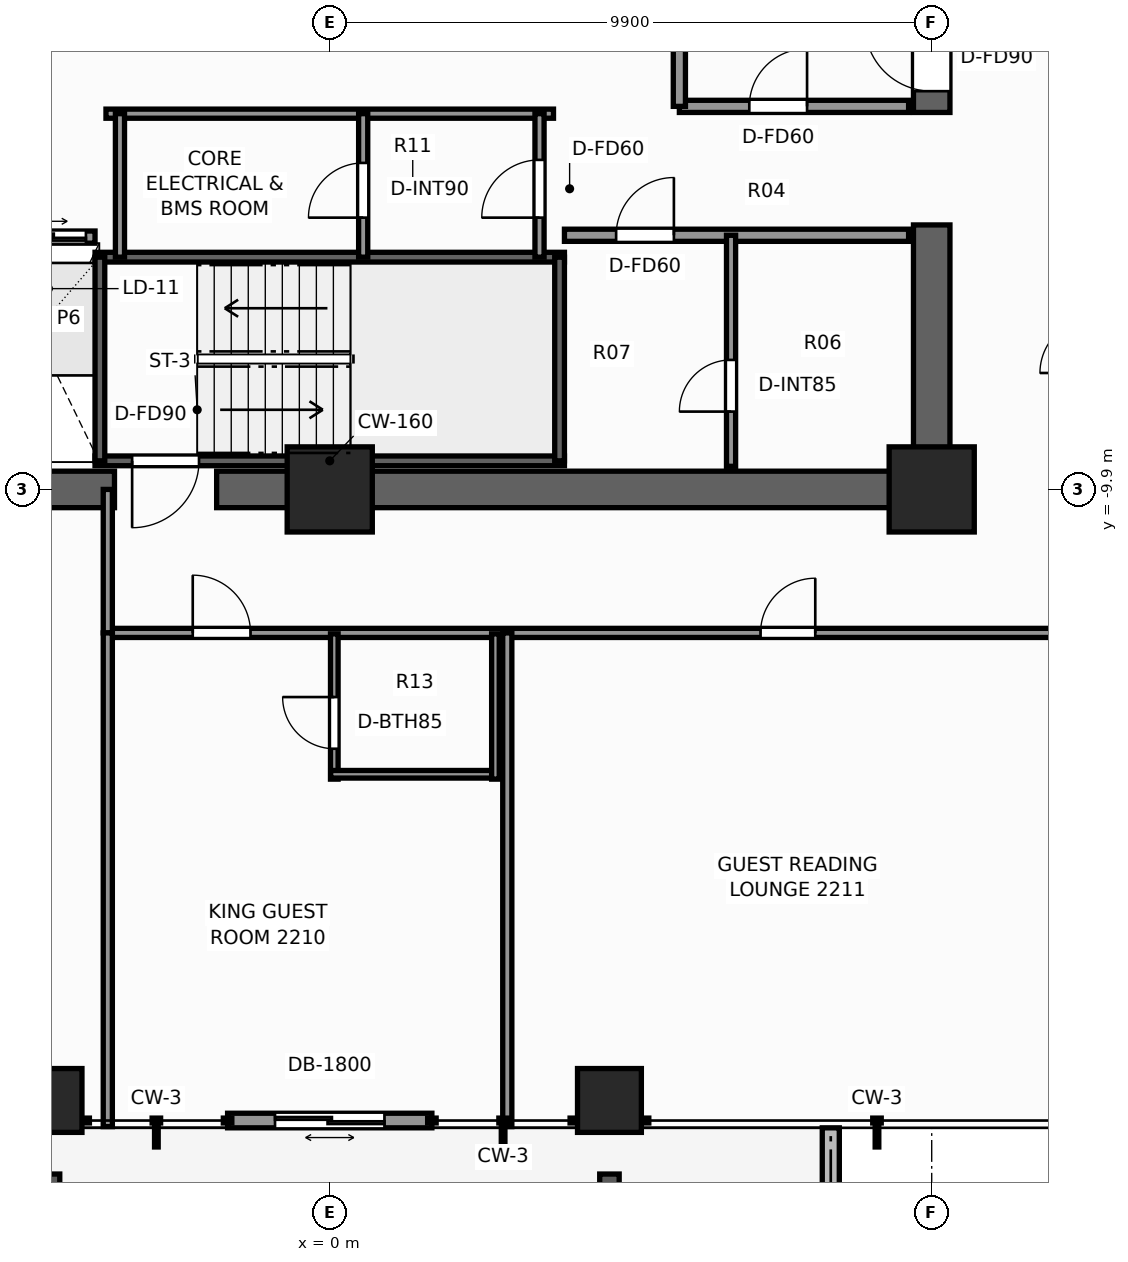
"""IFC4 building model, lengths in metres.
Left out: names, types, materials, properties, quantities, classifications, styles, units other than length and angle.
Written with IfcOpenShell. Run it as: python <this file> out.ifc"""

import sys

from ifc_helpers import new_model, si_unit, direction, frame, frame_2d, origin, origin_2d, place, context, subcontext, project, spatial, rectangle, extrude, element, fill, save


model = new_model("IFC4")
c1 = context("Model", 3, precision=1e-05, world=origin(), true_north=direction((0.0, 1.0)))
c2 = subcontext(c1, "Body", "Model", "MODEL_VIEW")
j1 = project(units=[si_unit("LENGTHUNIT", "METRE"), si_unit("PLANEANGLEUNIT", "RADIAN")], contexts=[c1])
p1 = place(None, origin())
s1 = spatial("IfcSite", under=j1, at=p1, CompositionType="ELEMENT")
p2 = place(p1, origin())
s2 = spatial("IfcBuilding", under=s1, at=p2, CompositionType="ELEMENT")
p3 = place(p2, frame((0.0, 0.0, 78.8)))
s3 = spatial("IfcBuildingStorey", under=s2, at=p3, CompositionType="ELEMENT", Elevation=78.8)
p4 = place(p3, frame((10.2, -9.9, 0.0), z_axis=(0.0, 0.0, 1.0), x_axis=(-1.0, 0.0, 0.0)))
e1 = element("IfcWall", 1, at=p4, inside=s3, PredefinedType="SHEAR", context=c2, shape_type="SweptSolid", body=[
    extrude(rectangle(XDim=12.06, YDim=0.6, at=frame_2d((6.03, 0.0))), origin(), (0.0, 0.0, 1.0), 3.3),
])
p5 = place(p3, frame((-3.54, -9.9, 0.0), z_axis=(0.0, 0.0, 1.0), x_axis=(-1.0, 0.0, 0.0)))
e2 = element("IfcWall", 2, at=p5, inside=s3, PredefinedType="SHEAR", context=c2, shape_type="SweptSolid", body=[
    extrude(rectangle(XDim=6.66, YDim=0.6, at=frame_2d((3.33, 0.0))), origin(), (0.0, 0.0, 1.0), 3.3),
])
p6 = place(p3, frame((9.9, -9.6, 0.0), z_axis=(0.0, 0.0, 1.0), x_axis=(0.0, 1.0, 0.0)))
e3 = element("IfcWall", 3, at=p6, inside=s3, PredefinedType="SHEAR", context=c2, shape_type="SweptSolid", body=[
    extrude(rectangle(XDim=4.05, YDim=0.6, at=frame_2d((2.025, 0.0))), origin(), (0.0, 0.0, 1.0), 3.3),
])
p7 = place(p3, frame((9.9, -3.7, 0.0), z_axis=(0.0, 0.0, 1.0), x_axis=(0.0, 1.0, 0.0)))
e4 = element("IfcWall", 4, at=p7, inside=s3, PredefinedType="SHEAR", context=c2, shape_type="SweptSolid", body=[
    extrude(rectangle(XDim=13.3, YDim=0.6, at=frame_2d((6.65, 0.0))), origin(), (0.0, 0.0, 1.0), 3.3),
])
p8 = place(p7, frame((0.35, 0.0, 0.0)))
e5 = element("IfcOpeningElement", 5, at=p8, cuts=e4, PredefinedType="OPENING", context=c2, shape_type="SweptSolid", body=[
    extrude(rectangle(XDim=1.1, YDim=2.2, at=frame_2d((0.55, 1.1))), frame((0.0, 0.31, 0.0), z_axis=(0.0, -1.0, 0.0), x_axis=(1.0, 0.0, 0.0)), (0.0, 0.0, 1.0), 0.62),
])
for number, where, z_axis, x_axis in (
    (6, (9.9, -9.9, 0.0), (0.0, 0.0, 1.0), (1.0, 0.0, 0.0)),
    (7, (0.0, -9.9, 0.0), (0.0, 0.0, 1.0), (1.0, 0.0, 0.0)),
):
    element("IfcColumn", number, at=place(p3, frame(where, z_axis=z_axis, x_axis=x_axis)), inside=s3, PredefinedType="COLUMN", context=c2, shape_type="SweptSolid", body=[
        extrude(rectangle(XDim=1.4, YDim=1.4, at=origin_2d()), origin(), (0.0, 0.0, 1.0), 3.3),
    ])
for number, where, z_axis, x_axis in (
    (8, (-4.6, -19.95, 0.0), (0.0, 0.0, 1.0), (1.0, 0.0, 0.0)),
    (9, (4.6, -19.95, 0.0), (0.0, 0.0, 1.0), (1.0, 0.0, 0.0)),
):
    element("IfcColumn", number, at=place(p3, frame(where, z_axis=z_axis, x_axis=x_axis)), inside=s3, PredefinedType="COLUMN", context=c2, shape_type="SweptSolid", body=[
        extrude(rectangle(XDim=1.05, YDim=1.05, at=origin_2d()), origin(), (0.0, 0.0, 1.0), 3.3),
    ])
p9 = place(p3, frame((8.24, -23.074, -0.04), z_axis=(0.0, 0.0, 1.0), x_axis=(0.0, 1.0, 0.0)))
e10 = element("IfcWall", 10, at=p9, inside=s3, PredefinedType="PARAPET", context=c2, shape_type="SweptSolid", body=[
    extrude(rectangle(XDim=2.674, YDim=0.28, at=frame_2d((1.337, 0.0))), origin(), (0.0, 0.0, 1.0), 0.42),
])
p10 = place(p3, frame((1.68, -20.28, 0.0), z_axis=(0.0, 0.0, 1.0), x_axis=(-1.0, 0.0, 0.0)))
e11 = element("IfcWall", 11, at=p10, inside=s3, PredefinedType="STANDARD", context=c2, shape_type="SweptSolid", body=[
    extrude(rectangle(XDim=3.36, YDim=0.24, at=frame_2d((1.68, 0.0))), origin(), (0.0, 0.0, 1.0), 3.08),
])
p11 = place(p10, frame((0.78, 0.0, 0.0)))
e12 = element("IfcOpeningElement", 12, at=p11, cuts=e11, PredefinedType="OPENING", context=c2, shape_type="SweptSolid", body=[
    extrude(rectangle(XDim=1.8, YDim=2.2, at=frame_2d((0.9, 1.1))), frame((0.0, 0.13, 0.0), z_axis=(0.0, -1.0, 0.0), x_axis=(1.0, 0.0, 0.0)), (0.0, 0.0, 1.0), 0.26),
])
p12 = place(p3, frame((3.86, -9.43, 0.0), z_axis=(0.0, 0.0, 1.0), x_axis=(-1.0, 0.0, 0.0)))
e13 = element("IfcWall", 13, at=p12, inside=s3, PredefinedType="SHEAR", context=c2, shape_type="SweptSolid", body=[
    extrude(rectangle(XDim=7.72, YDim=0.16, at=frame_2d((3.86, 0.0))), origin(), (0.0, 0.0, 1.0), 3.3),
])
p13 = place(p12, frame((6.01, 0.0, 0.0)))
e14 = element("IfcOpeningElement", 14, at=p13, cuts=e13, PredefinedType="OPENING", context=c2, shape_type="SweptSolid", body=[
    extrude(rectangle(XDim=1.1, YDim=2.2, at=frame_2d((0.55, 1.1))), frame((0.0, 0.09, 0.0), z_axis=(0.0, -1.0, 0.0), x_axis=(1.0, 0.0, 0.0)), (0.0, 0.0, 1.0), 0.18),
])
p14 = place(p3, frame((-3.86, -6.08, 0.0), z_axis=(0.0, 0.0, 1.0), x_axis=(1.0, 0.0, 0.0)))
e15 = element("IfcWall", 15, at=p14, inside=s3, PredefinedType="SHEAR", context=c2, shape_type="SweptSolid", body=[
    extrude(rectangle(XDim=7.72, YDim=0.16, at=frame_2d((3.86, 0.0))), origin(), (0.0, 0.0, 1.0), 3.3),
])
for number, where, z_axis, x_axis in (
    (16, (-3.78, -9.43, 0.0), (0.0, 0.0, 1.0), (0.0, 1.0, 0.0)),
    (17, (3.78, -9.43, 0.0), (0.0, 0.0, 1.0), (0.0, 1.0, 0.0)),
):
    element("IfcWall", number, at=place(p3, frame(where, z_axis=z_axis, x_axis=x_axis)), inside=s3, PredefinedType="SHEAR", context=c2, shape_type="SweptSolid", body=[
        extrude(rectangle(XDim=3.35, YDim=0.16, at=frame_2d((1.675, 0.0))), origin(), (0.0, 0.0, 1.0), 3.3),
    ])
p15 = place(p3, frame((5.75, -3.6, 0.0), z_axis=(0.0, 0.0, 1.0), x_axis=(1.0, 0.0, 0.0)))
e18 = element("IfcWall", 18, at=p15, inside=s3, PredefinedType="SOLIDWALL", context=c2, shape_type="SweptSolid", body=[
    extrude(rectangle(XDim=3.77, YDim=0.2, at=frame_2d((1.885, 0.0))), origin(), (0.0, 0.0, 1.0), 3.08),
])
p16 = place(p15, frame((1.15, 0.0, 0.0)))
e19 = element("IfcOpeningElement", 19, at=p16, cuts=e18, PredefinedType="OPENING", context=c2, shape_type="SweptSolid", body=[
    extrude(rectangle(XDim=0.95, YDim=2.06, at=frame_2d((0.475, 1.03))), frame((0.0, 0.11, 0.0), z_axis=(0.0, -1.0, 0.0), x_axis=(1.0, 0.0, 0.0)), (0.0, 0.0, 1.0), 0.22),
])
p17 = place(p3, frame((5.75, -3.6, 0.0), z_axis=(0.0, 0.0, 1.0), x_axis=(0.0, 1.0, 0.0)))
e20 = element("IfcWall", 20, at=p17, inside=s3, PredefinedType="SOLIDWALL", context=c2, shape_type="SweptSolid", body=[
    extrude(rectangle(XDim=5.57, YDim=0.2, at=frame_2d((2.785, 0.0))), origin(), (0.0, 0.0, 1.0), 3.08),
])
p18 = place(p17, frame((2.75, 0.0, 0.0)))
e21 = element("IfcOpeningElement", 21, at=p18, cuts=e20, PredefinedType="OPENING", context=c2, shape_type="SweptSolid", body=[
    extrude(rectangle(XDim=1.1, YDim=2.2, at=frame_2d((0.55, 1.1))), frame((0.0, 0.11, 0.0), z_axis=(0.0, -1.0, 0.0), x_axis=(1.0, 0.0, 0.0)), (0.0, 0.0, 1.0), 0.22),
])
p19 = place(p3, frame((-9.52, -5.75, 0.0), z_axis=(0.0, 0.0, 1.0), x_axis=(1.0, 0.0, 0.0)))
e22 = element("IfcWall", 22, at=p19, inside=s3, PredefinedType="SOLIDWALL", context=c2, shape_type="SweptSolid", body=[
    extrude(rectangle(XDim=5.66, YDim=0.2, at=frame_2d((2.83, 0.0))), origin(), (0.0, 0.0, 1.0), 3.08),
])
p20 = place(p19, frame((0.55, 0.0, 0.0)))
e23 = element("IfcOpeningElement", 23, at=p20, cuts=e22, PredefinedType="OPENING", context=c2, shape_type="SweptSolid", body=[
    extrude(rectangle(XDim=1.1, YDim=2.2, at=frame_2d((0.55, 1.1))), frame((0.0, 0.11, 0.0), z_axis=(0.0, -1.0, 0.0), x_axis=(1.0, 0.0, 0.0)), (0.0, 0.0, 1.0), 0.22),
])
p21 = place(p19, frame((2.48, 0.0, 0.0)))
e24 = element("IfcOpeningElement", 24, at=p21, cuts=e22, PredefinedType="OPENING", context=c2, shape_type="SweptSolid", body=[
    extrude(rectangle(XDim=1.1, YDim=2.2, at=frame_2d((0.55, 1.1))), frame((0.0, 0.11, 0.0), z_axis=(0.0, -1.0, 0.0), x_axis=(1.0, 0.0, 0.0)), (0.0, 0.0, 1.0), 0.22),
])
p22 = place(p19, frame((4.41, 0.0, 0.0)))
e25 = element("IfcOpeningElement", 25, at=p22, cuts=e22, PredefinedType="OPENING", context=c2, shape_type="SweptSolid", body=[
    extrude(rectangle(XDim=1.1, YDim=2.2, at=frame_2d((0.55, 1.1))), frame((0.0, 0.11, 0.0), z_axis=(0.0, -1.0, 0.0), x_axis=(1.0, 0.0, 0.0)), (0.0, 0.0, 1.0), 0.22),
])
p23 = place(p3, frame((3.86, -5.72, 0.0), z_axis=(0.0, 0.0, 1.0), x_axis=(1.0, 0.0, 0.0)))
e26 = element("IfcWall", 26, at=p23, inside=s3, PredefinedType="SOLIDWALL", context=c2, shape_type="SweptSolid", body=[
    extrude(rectangle(XDim=5.66, YDim=0.2, at=frame_2d((2.83, 0.0))), origin(), (0.0, 0.0, 1.0), 3.08),
])
p24 = place(p23, frame((0.85, 0.0, 0.0)))
e27 = element("IfcOpeningElement", 27, at=p24, cuts=e26, PredefinedType="OPENING", context=c2, shape_type="SweptSolid", body=[
    extrude(rectangle(XDim=0.95, YDim=2.06, at=frame_2d((0.475, 1.03))), frame((0.0, 0.11, 0.0), z_axis=(0.0, -1.0, 0.0), x_axis=(1.0, 0.0, 0.0)), (0.0, 0.0, 1.0), 0.22),
])
p25 = place(p3, frame((6.6, -9.52, 0.0), z_axis=(0.0, 0.0, 1.0), x_axis=(0.0, 1.0, 0.0)))
e28 = element("IfcWall", 28, at=p25, inside=s3, PredefinedType="PARTITIONING", context=c2, shape_type="SweptSolid", body=[
    extrude(rectangle(XDim=3.8, YDim=0.15, at=frame_2d((1.9, 0.0))), origin(), (0.0, 0.0, 1.0), 3.08),
])
p26 = place(p25, frame((0.9, 0.0, 0.0)))
e29 = element("IfcOpeningElement", 29, at=p26, cuts=e28, PredefinedType="OPENING", context=c2, shape_type="SweptSolid", body=[
    extrude(rectangle(XDim=0.85, YDim=2.03, at=frame_2d((0.425, 1.015))), frame((0.0, 0.085, 0.0), z_axis=(0.0, -1.0, 0.0), x_axis=(1.0, 0.0, 0.0)), (0.0, 0.0, 1.0), 0.17),
])
p27 = place(p3, frame((-3.68, -3.72, 0.0), z_axis=(0.0, 0.0, 1.0), x_axis=(1.0, 0.0, 0.0)))
e30 = element("IfcWall", 30, at=p27, inside=s3, PredefinedType="PARTITIONING", context=c2, shape_type="SweptSolid", body=[
    extrude(rectangle(XDim=7.36, YDim=0.15, at=frame_2d((3.68, 0.0))), origin(), (0.0, 0.0, 1.0), 3.08),
])
p28 = place(p3, frame((3.45, -6.08, 0.0), z_axis=(0.0, 0.0, 1.0), x_axis=(0.0, 1.0, 0.0)))
e31 = element("IfcWall", 31, at=p28, inside=s3, PredefinedType="PARTITIONING", context=c2, shape_type="SweptSolid", body=[
    extrude(rectangle(XDim=2.36, YDim=0.15, at=frame_2d((1.18, 0.0))), origin(), (0.0, 0.0, 1.0), 3.08),
])
p29 = place(p28, frame((0.65, 0.0, 0.0)))
e32 = element("IfcOpeningElement", 32, at=p29, cuts=e31, PredefinedType="OPENING", context=c2, shape_type="SweptSolid", body=[
    extrude(rectangle(XDim=0.95, YDim=2.06, at=frame_2d((0.475, 1.03))), frame((0.0, 0.085, 0.0), z_axis=(0.0, -1.0, 0.0), x_axis=(1.0, 0.0, 0.0)), (0.0, 0.0, 1.0), 0.17),
])
p30 = place(p3, frame((-3.45, -6.08, 0.0), z_axis=(0.0, 0.0, 1.0), x_axis=(0.0, 1.0, 0.0)))
e33 = element("IfcWall", 33, at=p30, inside=s3, PredefinedType="PARTITIONING", context=c2, shape_type="SweptSolid", body=[
    extrude(rectangle(XDim=2.36, YDim=0.15, at=frame_2d((1.18, 0.0))), origin(), (0.0, 0.0, 1.0), 3.08),
])
p31 = place(p3, frame((0.55, -6.08, 0.0), z_axis=(0.0, 0.0, 1.0), x_axis=(0.0, 1.0, 0.0)))
e34 = element("IfcWall", 34, at=p31, inside=s3, PredefinedType="PARTITIONING", context=c2, shape_type="SweptSolid", body=[
    extrude(rectangle(XDim=2.36, YDim=0.15, at=frame_2d((1.18, 0.0))), origin(), (0.0, 0.0, 1.0), 3.08),
])
p32 = place(p31, frame((0.65, 0.0, 0.0)))
e35 = element("IfcOpeningElement", 35, at=p32, cuts=e34, PredefinedType="OPENING", context=c2, shape_type="SweptSolid", body=[
    extrude(rectangle(XDim=0.9, YDim=2.06, at=frame_2d((0.45, 1.03))), frame((0.0, 0.085, 0.0), z_axis=(0.0, -1.0, 0.0), x_axis=(1.0, 0.0, 0.0)), (0.0, 0.0, 1.0), 0.17),
])
p33 = place(p3, frame((-3.65, -12.26, 0.0), z_axis=(0.0, 0.0, 1.0), x_axis=(1.0, 0.0, 0.0)))
e36 = element("IfcWall", 36, at=p33, inside=s3, PredefinedType="PARTITIONING", context=c2, shape_type="SweptSolid", body=[
    extrude(rectangle(XDim=16.23, YDim=0.15, at=frame_2d((8.115, 0.0))), origin(), (0.0, 0.0, 1.0), 2.292),
])
p34 = place(p33, frame((1.397, 0.0, 0.0)))
e37 = element("IfcOpeningElement", 37, at=p34, cuts=e36, PredefinedType="OPENING", context=c2, shape_type="SweptSolid", body=[
    extrude(rectangle(XDim=0.95, YDim=2.06, at=frame_2d((0.475, 1.03))), frame((0.0, 0.085, 0.0), z_axis=(0.0, -1.0, 0.0), x_axis=(1.0, 0.0, 0.0)), (0.0, 0.0, 1.0), 0.17),
])
p35 = place(p33, frame((10.735, 0.0, 0.0)))
e38 = element("IfcOpeningElement", 38, at=p35, cuts=e36, PredefinedType="OPENING", context=c2, shape_type="SweptSolid", body=[
    extrude(rectangle(XDim=0.9, YDim=2.06, at=frame_2d((0.45, 1.03))), frame((0.0, 0.085, 0.0), z_axis=(0.0, -1.0, 0.0), x_axis=(1.0, 0.0, 0.0)), (0.0, 0.0, 1.0), 0.17),
])
p36 = place(p3, frame((-3.65, -12.26, 0.0), z_axis=(0.0, 0.0, 1.0), x_axis=(0.0, 1.0, 0.0)))
e39 = element("IfcWall", 39, at=p36, inside=s3, PredefinedType="PARTITIONING", context=c2, shape_type="SweptSolid", body=[
    extrude(rectangle(XDim=2.36, YDim=0.15, at=frame_2d((1.18, 0.0))), origin(), (0.0, 0.0, 1.0), 3.08),
])
for number, where, z_axis, x_axis in (
    (40, (-3.65, -20.38, 0.0), (0.0, 0.0, 1.0), (0.0, 1.0, 0.0)),
    (41, (2.92, -20.38, 0.0), (0.0, 0.0, 1.0), (0.0, 1.0, 0.0)),
):
    element("IfcWall", number, at=place(p3, frame(where, z_axis=z_axis, x_axis=x_axis)), inside=s3, PredefinedType="PARTITIONING", context=c2, shape_type="SweptSolid", body=[
        extrude(rectangle(XDim=8.12, YDim=0.15, at=frame_2d((4.06, 0.0))), origin(), (0.0, 0.0, 1.0), 2.449),
    ])
p37 = place(p3, frame((0.075, -14.665, 0.0), z_axis=(0.0, 0.0, 1.0), x_axis=(0.0, 1.0, 0.0)))
e42 = element("IfcWall", 42, at=p37, inside=s3, PredefinedType="PARTITIONING", context=c2, shape_type="SweptSolid", body=[
    extrude(rectangle(XDim=2.39, YDim=0.125, at=frame_2d((1.195, 0.0))), origin(), (0.0, 0.0, 1.0), 2.605),
])
p38 = place(p37, frame((0.5, 0.0, 0.0)))
e43 = element("IfcOpeningElement", 43, at=p38, cuts=e42, PredefinedType="OPENING", context=c2, shape_type="SweptSolid", body=[
    extrude(rectangle(XDim=0.85, YDim=2.03, at=frame_2d((0.425, 1.015))), frame((0.0, 0.073, 0.0), z_axis=(0.0, -1.0, 0.0), x_axis=(1.0, 0.0, 0.0)), (0.0, 0.0, 1.0), 0.145),
])
p39 = place(p3, frame((0.015, -14.585, 0.0), z_axis=(0.0, 0.0, 1.0), x_axis=(1.0, 0.0, 0.0)))
e44 = element("IfcWall", 44, at=p39, inside=s3, PredefinedType="PARTITIONING", context=c2, shape_type="SweptSolid", body=[
    extrude(rectangle(XDim=2.77, YDim=0.125, at=frame_2d((1.385, 0.0))), origin(), (0.0, 0.0, 1.0), 2.605),
])
p40 = place(p3, frame((2.725, -14.665, 0.0), z_axis=(0.0, 0.0, 1.0), x_axis=(0.0, 1.0, 0.0)))
e45 = element("IfcWall", 45, at=p40, inside=s3, PredefinedType="PARTITIONING", context=c2, shape_type="SweptSolid", body=[
    extrude(rectangle(XDim=2.39, YDim=0.125, at=frame_2d((1.195, 0.0))), origin(), (0.0, 0.0, 1.0), 3.08),
])
p41 = place(p11, origin())
e46 = element("IfcDoor", 46, at=p41, inside=s3, OperationType="DOUBLE_DOOR_SLIDING", PredefinedType="DOOR", context=c2, shape_type="SweptSolid", body=[
    extrude(rectangle(XDim=1.8, YDim=2.2, at=frame_2d((0.9, 1.1))), frame((0.0, 0.025, 0.0), z_axis=(0.0, -1.0, 0.0), x_axis=(1.0, 0.0, 0.0)), (0.0, 0.0, 1.0), 0.05),
])
fill(e12, e46)
p42 = place(p13, origin())
e47 = element("IfcDoor", 47, at=p42, inside=s3, OperationType="SINGLE_SWING_RIGHT", PredefinedType="DOOR", context=c2, shape_type="SweptSolid", body=[
    extrude(rectangle(XDim=1.1, YDim=2.2, at=frame_2d((0.55, 1.1))), frame((0.0, 0.025, 0.0), z_axis=(0.0, -1.0, 0.0), x_axis=(1.0, 0.0, 0.0)), (0.0, 0.0, 1.0), 0.05),
])
fill(e14, e47)
p43 = place(p8, origin())
e48 = element("IfcDoor", 48, at=p43, inside=s3, OperationType="SINGLE_SWING_RIGHT", PredefinedType="DOOR", context=c2, shape_type="SweptSolid", body=[
    extrude(rectangle(XDim=1.1, YDim=2.2, at=frame_2d((0.55, 1.1))), frame((0.0, 0.025, 0.0), z_axis=(0.0, -1.0, 0.0), x_axis=(1.0, 0.0, 0.0)), (0.0, 0.0, 1.0), 0.05),
])
fill(e5, e48)
p44 = place(p22, origin())
e49 = element("IfcDoor", 49, at=p44, inside=s3, OperationType="DOUBLE_DOOR_SLIDING", PredefinedType="DOOR", context=c2, shape_type="SweptSolid", body=[
    extrude(rectangle(XDim=1.1, YDim=2.2, at=frame_2d((0.55, 1.1))), frame((0.0, 0.025, 0.0), z_axis=(0.0, -1.0, 0.0), x_axis=(1.0, 0.0, 0.0)), (0.0, 0.0, 1.0), 0.05),
])
fill(e25, e49)
p45 = place(p24, origin())
e50 = element("IfcDoor", 50, at=p45, inside=s3, OperationType="SINGLE_SWING_RIGHT", PredefinedType="DOOR", context=c2, shape_type="SweptSolid", body=[
    extrude(rectangle(XDim=0.95, YDim=2.06, at=frame_2d((0.475, 1.03))), frame((0.0, 0.025, 0.0), z_axis=(0.0, -1.0, 0.0), x_axis=(1.0, 0.0, 0.0)), (0.0, 0.0, 1.0), 0.05),
])
fill(e27, e50)
p46 = place(p26, origin())
e51 = element("IfcDoor", 51, at=p46, inside=s3, OperationType="SINGLE_SWING_LEFT", PredefinedType="DOOR", context=c2, shape_type="SweptSolid", body=[
    extrude(rectangle(XDim=0.85, YDim=2.03, at=frame_2d((0.425, 1.015))), frame((0.0, 0.025, 0.0), z_axis=(0.0, -1.0, 0.0), x_axis=(1.0, 0.0, 0.0)), (0.0, 0.0, 1.0), 0.05),
])
fill(e29, e51)
p47 = place(p16, origin())
e52 = element("IfcDoor", 52, at=p47, inside=s3, OperationType="SINGLE_SWING_RIGHT", PredefinedType="DOOR", context=c2, shape_type="SweptSolid", body=[
    extrude(rectangle(XDim=0.95, YDim=2.06, at=frame_2d((0.475, 1.03))), frame((0.0, 0.025, 0.0), z_axis=(0.0, -1.0, 0.0), x_axis=(1.0, 0.0, 0.0)), (0.0, 0.0, 1.0), 0.05),
])
fill(e19, e52)
p48 = place(p29, origin())
e53 = element("IfcDoor", 53, at=p48, inside=s3, OperationType="SINGLE_SWING_LEFT", PredefinedType="DOOR", context=c2, shape_type="SweptSolid", body=[
    extrude(rectangle(XDim=0.95, YDim=2.06, at=frame_2d((0.475, 1.03))), frame((0.0, 0.025, 0.0), z_axis=(0.0, -1.0, 0.0), x_axis=(1.0, 0.0, 0.0)), (0.0, 0.0, 1.0), 0.05),
])
fill(e32, e53)
p49 = place(p32, origin())
e54 = element("IfcDoor", 54, at=p49, inside=s3, OperationType="SINGLE_SWING_LEFT", PredefinedType="DOOR", context=c2, shape_type="SweptSolid", body=[
    extrude(rectangle(XDim=0.9, YDim=2.06, at=frame_2d((0.45, 1.03))), frame((0.0, 0.025, 0.0), z_axis=(0.0, -1.0, 0.0), x_axis=(1.0, 0.0, 0.0)), (0.0, 0.0, 1.0), 0.05),
])
fill(e35, e54)
p50 = place(p38, origin())
e55 = element("IfcDoor", 55, at=p50, inside=s3, OperationType="SINGLE_SWING_RIGHT", PredefinedType="DOOR", context=c2, shape_type="SweptSolid", body=[
    extrude(rectangle(XDim=0.85, YDim=2.03, at=frame_2d((0.425, 1.015))), frame((0.0, 0.025, 0.0), z_axis=(0.0, -1.0, 0.0), x_axis=(1.0, 0.0, 0.0)), (0.0, 0.0, 1.0), 0.05),
])
fill(e43, e55)
p51 = place(p34, origin())
e56 = element("IfcDoor", 56, at=p51, inside=s3, OperationType="SINGLE_SWING_LEFT", PredefinedType="DOOR", context=c2, shape_type="SweptSolid", body=[
    extrude(rectangle(XDim=0.95, YDim=2.06, at=frame_2d((0.475, 1.03))), frame((0.0, 0.025, 0.0), z_axis=(0.0, -1.0, 0.0), x_axis=(1.0, 0.0, 0.0)), (0.0, 0.0, 1.0), 0.05),
])
fill(e37, e56)
p52 = place(p35, origin())
e57 = element("IfcDoor", 57, at=p52, inside=s3, OperationType="SINGLE_SWING_RIGHT", PredefinedType="DOOR", context=c2, shape_type="SweptSolid", body=[
    extrude(rectangle(XDim=0.9, YDim=2.06, at=frame_2d((0.45, 1.03))), frame((0.0, 0.025, 0.0), z_axis=(0.0, -1.0, 0.0), x_axis=(1.0, 0.0, 0.0)), (0.0, 0.0, 1.0), 0.05),
])
fill(e38, e57)
save(model, sys.argv[1])
